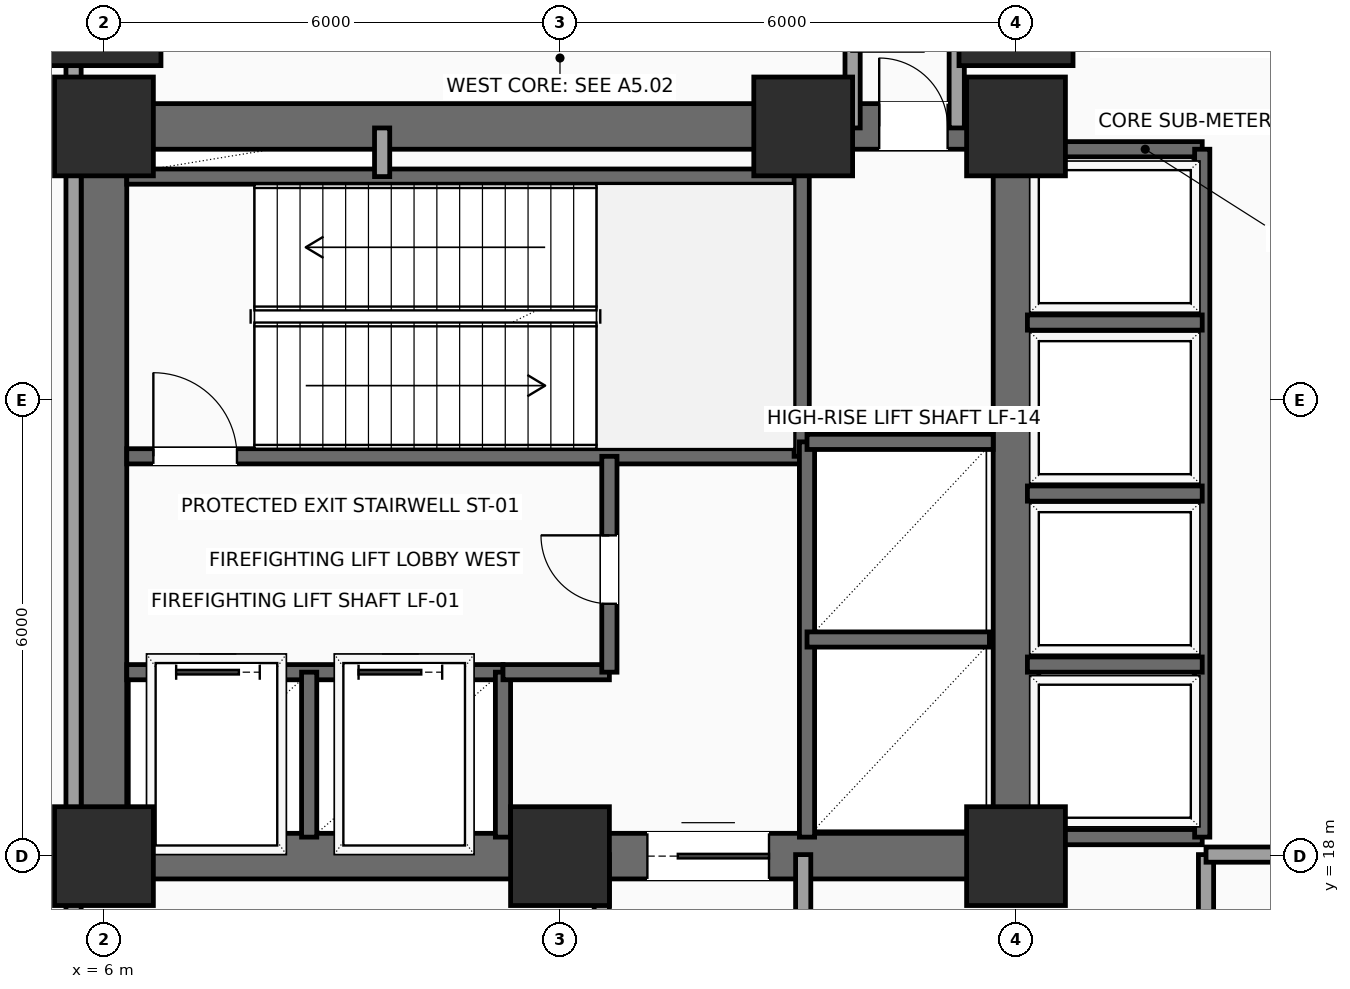
"""IFC4 building model, lengths in metres.
Left out: names, types, materials, properties, quantities, classifications, styles, units other than length and angle.
Written with IfcOpenShell. Run it as: python <this file> out.ifc"""

import sys

from ifc_helpers import new_model, si_unit, direction, frame, frame_2d, origin, origin_2d, place, context, subcontext, project, spatial, rectangle, extrude, element, fill, save


model = new_model("IFC4")
c1 = context("Model", 3, precision=1e-05, world=origin(), true_north=direction((0.0, 1.0)))
c2 = subcontext(c1, "Body", "Model", "MODEL_VIEW")
j1 = project(units=[si_unit("LENGTHUNIT", "METRE"), si_unit("PLANEANGLEUNIT", "RADIAN")], contexts=[c1])
p1 = place(None, origin())
s1 = spatial("IfcSite", under=j1, at=p1, CompositionType="ELEMENT")
p2 = place(p1, origin())
s2 = spatial("IfcBuilding", under=s1, at=p2, CompositionType="ELEMENT")
p3 = place(p2, frame((0.0, 0.0, 27.6)))
s3 = spatial("IfcBuildingStorey", under=s2, at=p3, CompositionType="ELEMENT", Elevation=27.6)
for number, where, z_axis, x_axis in (
    (1, (6.0, 18.0, 0.0), (0.0, 0.0, 1.0), (1.0, 0.0, 0.0)),
    (2, (12.0, 18.0, 0.0), (0.0, 0.0, 1.0), (1.0, 0.0, 0.0)),
    (3, (18.0, 18.0, 0.0), (0.0, 0.0, 1.0), (1.0, 0.0, 0.0)),
    (4, (6.0, 27.6, 0.0), (0.0, 0.0, 1.0), (1.0, 0.0, 0.0)),
    (5, (15.2, 27.6, 0.0), (0.0, 0.0, 1.0), (1.0, 0.0, 0.0)),
    (6, (18.0, 27.6, 0.0), (0.0, 0.0, 1.0), (1.0, 0.0, 0.0)),
):
    element("IfcColumn", number, at=place(p3, frame(where, z_axis=z_axis, x_axis=x_axis)), inside=s3, PredefinedType="COLUMN", context=c2, shape_type="SweptSolid", body=[
        extrude(rectangle(XDim=1.3, YDim=1.3, at=origin_2d()), origin(), (0.0, 0.0, 1.0), 4.8),
    ])
for number, where, z_axis, x_axis in (
    (7, (6.0, 29.15, -0.35), (0.0, 0.0, 1.0), (1.0, 0.0, 0.0)),
    (8, (18.0, 29.15, -0.35), (0.0, 0.0, 1.0), (1.0, 0.0, 0.0)),
):
    element("IfcColumn", number, at=place(p3, frame(where, z_axis=z_axis, x_axis=x_axis)), inside=s3, PredefinedType="COLUMN", context=c2, shape_type="SweptSolid", body=[
        extrude(rectangle(XDim=1.5, YDim=1.5, at=origin_2d()), origin(), (0.0, 0.0, 1.0), 5.15),
    ])
p4 = place(p3, frame((6.0, 18.0, 0.0), z_axis=(0.0, 0.0, 1.0), x_axis=(1.0, 0.0, 0.0)))
e9 = element("IfcWall", 9, at=p4, inside=s3, PredefinedType="SHEAR", context=c2, shape_type="SweptSolid", body=[
    extrude(rectangle(XDim=12.0, YDim=0.6, at=frame_2d((6.0, 0.0))), origin(), (0.0, 0.0, 1.0), 4.55),
])
p5 = place(p4, frame((7.15, 0.0, 0.0)))
e10 = element("IfcOpeningElement", 10, at=p5, cuts=e9, PredefinedType="OPENING", context=c2, shape_type="SweptSolid", body=[
    extrude(rectangle(XDim=1.6, YDim=2.3, at=frame_2d((0.8, 1.15))), frame((0.0, 0.31, 0.0), z_axis=(0.0, -1.0, 0.0), x_axis=(1.0, 0.0, 0.0)), (0.0, 0.0, 1.0), 0.62),
])
p6 = place(p3, frame((6.0, 27.6, 0.0), z_axis=(0.0, 0.0, 1.0), x_axis=(1.0, 0.0, 0.0)))
e11 = element("IfcWall", 11, at=p6, inside=s3, PredefinedType="SHEAR", context=c2, shape_type="SweptSolid", body=[
    extrude(rectangle(XDim=12.0, YDim=0.6, at=frame_2d((6.0, 0.0))), origin(), (0.0, 0.0, 1.0), 4.55),
])
p7 = place(p6, frame((10.2, 0.0, 0.0)))
e12 = element("IfcOpeningElement", 12, at=p7, cuts=e11, PredefinedType="OPENING", context=c2, shape_type="SweptSolid", body=[
    extrude(rectangle(XDim=0.9, YDim=2.15, at=frame_2d((0.45, 1.075))), frame((0.0, 0.31, 0.0), z_axis=(0.0, -1.0, 0.0), x_axis=(1.0, 0.0, 0.0)), (0.0, 0.0, 1.0), 0.62),
])
for number, where, z_axis, x_axis in (
    (13, (6.0, 18.0, 0.0), (0.0, 0.0, 1.0), (0.0, 1.0, 0.0)),
    (14, (18.0, 18.0, 0.0), (0.0, 0.0, 1.0), (0.0, 1.0, 0.0)),
):
    element("IfcWall", number, at=place(p3, frame(where, z_axis=z_axis, x_axis=x_axis)), inside=s3, PredefinedType="SHEAR", context=c2, shape_type="SweptSolid", body=[
        extrude(rectangle(XDim=9.6, YDim=0.6, at=frame_2d((4.8, 0.0))), origin(), (0.0, 0.0, 1.0), 4.55),
    ])
p8 = place(p3, frame((6.3, 23.26, 0.0), z_axis=(0.0, 0.0, 1.0), x_axis=(1.0, 0.0, 0.0)))
e15 = element("IfcWall", 15, at=p8, inside=s3, PredefinedType="SHEAR", context=c2, shape_type="SweptSolid", body=[
    extrude(rectangle(XDim=8.88, YDim=0.2, at=frame_2d((4.44, 0.0))), origin(), (0.0, 0.0, 1.0), 4.55),
])
p9 = place(p8, frame((0.35, 0.0, 0.0)))
e16 = element("IfcOpeningElement", 16, at=p9, cuts=e15, PredefinedType="OPENING", context=c2, shape_type="SweptSolid", body=[
    extrude(rectangle(XDim=1.1, YDim=2.2, at=frame_2d((0.55, 1.1))), frame((0.0, 0.11, 0.0), z_axis=(0.0, -1.0, 0.0), x_axis=(1.0, 0.0, 0.0)), (0.0, 0.0, 1.0), 0.22),
])
p10 = place(p3, frame((6.3, 26.94, 0.0), z_axis=(0.0, 0.0, 1.0), x_axis=(1.0, 0.0, 0.0)))
e17 = element("IfcWall", 17, at=p10, inside=s3, PredefinedType="SHEAR", context=c2, shape_type="SweptSolid", body=[
    extrude(rectangle(XDim=8.88, YDim=0.2, at=frame_2d((4.44, 0.0))), origin(), (0.0, 0.0, 1.0), 4.55),
])
p11 = place(p3, frame((15.18, 23.26, 0.0), z_axis=(0.0, 0.0, 1.0), x_axis=(0.0, 1.0, 0.0)))
e18 = element("IfcWall", 18, at=p11, inside=s3, PredefinedType="SHEAR", context=c2, shape_type="SweptSolid", body=[
    extrude(rectangle(XDim=4.04, YDim=0.2, at=frame_2d((2.02, 0.0))), origin(), (0.0, 0.0, 1.0), 4.55),
])
p12 = place(p3, frame((6.3, 20.42, 0.0), z_axis=(0.0, 0.0, 1.0), x_axis=(1.0, 0.0, 0.0)))
e19 = element("IfcWall", 19, at=p12, inside=s3, PredefinedType="SHEAR", context=c2, shape_type="SweptSolid", body=[
    extrude(rectangle(XDim=4.95, YDim=0.2, at=frame_2d((2.475, 0.0))), origin(), (0.0, 0.0, 1.0), 4.55),
])
p13 = place(p12, frame((0.65, 0.0, 0.0)))
e20 = element("IfcOpeningElement", 20, at=p13, cuts=e19, PredefinedType="OPENING", context=c2, shape_type="SweptSolid", body=[
    extrude(rectangle(XDim=1.1, YDim=2.2, at=frame_2d((0.55, 1.1))), frame((0.0, 0.11, 0.0), z_axis=(0.0, -1.0, 0.0), x_axis=(1.0, 0.0, 0.0)), (0.0, 0.0, 1.0), 0.22),
])
p14 = place(p12, frame((3.05, 0.0, 0.0)))
e21 = element("IfcOpeningElement", 21, at=p14, cuts=e19, PredefinedType="OPENING", context=c2, shape_type="SweptSolid", body=[
    extrude(rectangle(XDim=1.1, YDim=2.2, at=frame_2d((0.55, 1.1))), frame((0.0, 0.11, 0.0), z_axis=(0.0, -1.0, 0.0), x_axis=(1.0, 0.0, 0.0)), (0.0, 0.0, 1.0), 0.22),
])
for number, where, z_axis, x_axis in (
    (22, (8.7, 18.25, 0.0), (0.0, 0.0, 1.0), (0.0, 1.0, 0.0)),
    (23, (11.25, 18.25, 0.0), (0.0, 0.0, 1.0), (0.0, 1.0, 0.0)),
):
    element("IfcWall", number, at=place(p3, frame(where, z_axis=z_axis, x_axis=x_axis)), inside=s3, PredefinedType="SHEAR", context=c2, shape_type="SweptSolid", body=[
        extrude(rectangle(XDim=2.17, YDim=0.2, at=frame_2d((1.085, 0.0))), origin(), (0.0, 0.0, 1.0), 4.55),
    ])
p15 = place(p3, frame((11.25, 20.42, 0.0), z_axis=(0.0, 0.0, 1.0), x_axis=(1.0, 0.0, 0.0)))
e24 = element("IfcWall", 24, at=p15, inside=s3, PredefinedType="SHEAR", context=c2, shape_type="SweptSolid", body=[
    extrude(rectangle(XDim=1.4, YDim=0.2, at=frame_2d((0.7, 0.0))), origin(), (0.0, 0.0, 1.0), 4.55),
])
p16 = place(p3, frame((12.65, 20.42, 0.0), z_axis=(0.0, 0.0, 1.0), x_axis=(0.0, 1.0, 0.0)))
e25 = element("IfcWall", 25, at=p16, inside=s3, PredefinedType="SHEAR", context=c2, shape_type="SweptSolid", body=[
    extrude(rectangle(XDim=2.84, YDim=0.2, at=frame_2d((1.42, 0.0))), origin(), (0.0, 0.0, 1.0), 4.55),
])
p17 = place(p16, frame((0.9, 0.0, 0.0)))
e26 = element("IfcOpeningElement", 26, at=p17, cuts=e25, PredefinedType="OPENING", context=c2, shape_type="SweptSolid", body=[
    extrude(rectangle(XDim=0.9, YDim=2.15, at=frame_2d((0.45, 1.075))), frame((0.0, 0.11, 0.0), z_axis=(0.0, -1.0, 0.0), x_axis=(1.0, 0.0, 0.0)), (0.0, 0.0, 1.0), 0.22),
])
p18 = place(p3, frame((9.66, 26.94, 0.0), z_axis=(0.0, 0.0, 1.0), x_axis=(0.0, 1.0, 0.0)))
e27 = element("IfcWall", 27, at=p18, inside=s3, PredefinedType="SOLIDWALL", context=c2, shape_type="SweptSolid", body=[
    extrude(rectangle(XDim=0.64, YDim=0.2, at=frame_2d((0.32, 0.0))), origin(), (0.0, 0.0, 1.0), 4.55),
])
p19 = place(p3, frame((15.25, 18.25, 0.0), z_axis=(0.0, 0.0, 1.0), x_axis=(0.0, 1.0, 0.0)))
e28 = element("IfcWall", 28, at=p19, inside=s3, PredefinedType="SHEAR", context=c2, shape_type="SweptSolid", body=[
    extrude(rectangle(XDim=5.2, YDim=0.2, at=frame_2d((2.6, 0.0))), origin(), (0.0, 0.0, 1.0), 4.55),
])
p20 = place(p3, frame((15.25, 20.85, 0.0), z_axis=(0.0, 0.0, 1.0), x_axis=(1.0, 0.0, 0.0)))
e29 = element("IfcWall", 29, at=p20, inside=s3, PredefinedType="SHEAR", context=c2, shape_type="SweptSolid", body=[
    extrude(rectangle(XDim=2.4, YDim=0.2, at=frame_2d((1.2, 0.0))), origin(), (0.0, 0.0, 1.0), 4.55),
])
p21 = place(p3, frame((15.25, 23.45, 0.0), z_axis=(0.0, 0.0, 1.0), x_axis=(1.0, 0.0, 0.0)))
e30 = element("IfcWall", 30, at=p21, inside=s3, PredefinedType="SHEAR", context=c2, shape_type="SweptSolid", body=[
    extrude(rectangle(XDim=2.45, YDim=0.2, at=frame_2d((1.225, 0.0))), origin(), (0.0, 0.0, 1.0), 4.55),
])
for number, where, z_axis, x_axis in (
    (31, (18.1, 27.3, 0.0), (0.0, 0.0, 1.0), (1.0, 0.0, 0.0)),
    (32, (18.1, 18.25, 0.0), (0.0, 0.0, 1.0), (1.0, 0.0, 0.0)),
):
    element("IfcWall", number, at=place(p3, frame(where, z_axis=z_axis, x_axis=x_axis)), inside=s3, PredefinedType="SHEAR", context=c2, shape_type="SweptSolid", body=[
        extrude(rectangle(XDim=2.35, YDim=0.2, at=frame_2d((1.175, 0.0))), origin(), (0.0, 0.0, 1.0), 4.55),
    ])
p22 = place(p3, frame((20.45, 18.25, 0.0), z_axis=(0.0, 0.0, 1.0), x_axis=(0.0, 1.0, 0.0)))
e33 = element("IfcWall", 33, at=p22, inside=s3, PredefinedType="SHEAR", context=c2, shape_type="SweptSolid", body=[
    extrude(rectangle(XDim=9.05, YDim=0.2, at=frame_2d((4.525, 0.0))), origin(), (0.0, 0.0, 1.0), 4.55),
])
for number, where, z_axis, x_axis in (
    (34, (18.15, 20.52, 0.0), (0.0, 0.0, 1.0), (1.0, 0.0, 0.0)),
    (35, (18.15, 22.77, 0.0), (0.0, 0.0, 1.0), (1.0, 0.0, 0.0)),
    (36, (18.15, 25.02, 0.0), (0.0, 0.0, 1.0), (1.0, 0.0, 0.0)),
):
    element("IfcWall", number, at=place(p3, frame(where, z_axis=z_axis, x_axis=x_axis)), inside=s3, PredefinedType="SHEAR", context=c2, shape_type="SweptSolid", body=[
        extrude(rectangle(XDim=2.3, YDim=0.2, at=frame_2d((1.15, 0.0))), origin(), (0.0, 0.0, 1.0), 4.55),
    ])
p23 = place(p3, frame((17.22, 33.8, 0.0), z_axis=(0.0, 0.0, 1.0), x_axis=(0.0, -1.0, 0.0)))
e37 = element("IfcWall", 37, at=p23, inside=s3, PredefinedType="SOLIDWALL", context=c2, shape_type="SweptSolid", body=[
    extrude(rectangle(XDim=6.22, YDim=0.2, at=frame_2d((3.11, 0.0))), origin(), (0.0, 0.0, 1.0), 4.55),
])
p24 = place(p3, frame((15.85, 27.58, 0.0), z_axis=(0.0, 0.0, 1.0), x_axis=(0.0, 1.0, 0.0)))
e38 = element("IfcWall", 38, at=p24, inside=s3, PredefinedType="SOLIDWALL", context=c2, shape_type="SweptSolid", body=[
    extrude(rectangle(XDim=1.12, YDim=0.2, at=frame_2d((0.56, 0.0))), origin(), (0.0, 0.0, 1.0), 4.55),
])
p25 = place(p3, frame((5.6, 31.6, 0.0), z_axis=(0.0, 0.0, 1.0), x_axis=(0.0, -1.0, 0.0)))
e39 = element("IfcWall", 39, at=p25, inside=s3, PredefinedType="SOLIDWALL", context=c2, shape_type="SweptSolid", body=[
    extrude(rectangle(XDim=15.15, YDim=0.2, at=frame_2d((7.575, 0.0))), origin(), (0.0, 0.0, 1.0), 4.55),
])
for number, where, z_axis, x_axis in (
    (40, (12.55, 16.45, 0.0), (0.0, 0.0, 1.0), (0.0, 1.0, 0.0)),
    (41, (15.2, 18.02, 0.0), (0.0, 0.0, 1.0), (0.0, -1.0, 0.0)),
    (42, (20.5, 16.45, 0.0), (0.0, 0.0, 1.0), (0.0, 1.0, 0.0)),
):
    element("IfcWall", number, at=place(p3, frame(where, z_axis=z_axis, x_axis=x_axis)), inside=s3, PredefinedType="SOLIDWALL", context=c2, shape_type="SweptSolid", body=[
        extrude(rectangle(XDim=1.57, YDim=0.2, at=frame_2d((0.785, 0.0))), origin(), (0.0, 0.0, 1.0), 4.55),
    ])
p26 = place(p3, frame((20.5, 18.02, 0.0), z_axis=(0.0, 0.0, 1.0), x_axis=(1.0, 0.0, 0.0)))
e43 = element("IfcWall", 43, at=p26, inside=s3, PredefinedType="SOLIDWALL", context=c2, shape_type="SweptSolid", body=[
    extrude(rectangle(XDim=3.35, YDim=0.2, at=frame_2d((1.675, 0.0))), origin(), (0.0, 0.0, 1.0), 3.892),
])
p27 = place(p5, origin())
e44 = element("IfcDoor", 44, at=p27, inside=s3, OperationType="DOUBLE_DOOR_SLIDING", PredefinedType="DOOR", context=c2, shape_type="SweptSolid", body=[
    extrude(rectangle(XDim=1.6, YDim=2.3, at=frame_2d((0.8, 1.15))), frame((0.0, 0.025, 0.0), z_axis=(0.0, -1.0, 0.0), x_axis=(1.0, 0.0, 0.0)), (0.0, 0.0, 1.0), 0.05),
])
fill(e10, e44)
p28 = place(p7, origin())
e45 = element("IfcDoor", 45, at=p28, inside=s3, OperationType="SINGLE_SWING_LEFT", PredefinedType="DOOR", context=c2, shape_type="SweptSolid", body=[
    extrude(rectangle(XDim=0.9, YDim=2.15, at=frame_2d((0.45, 1.075))), frame((0.0, 0.025, 0.0), z_axis=(0.0, -1.0, 0.0), x_axis=(1.0, 0.0, 0.0)), (0.0, 0.0, 1.0), 0.05),
])
fill(e12, e45)
p29 = place(p9, origin())
e46 = element("IfcDoor", 46, at=p29, inside=s3, OperationType="SINGLE_SWING_LEFT", PredefinedType="DOOR", context=c2, shape_type="SweptSolid", body=[
    extrude(rectangle(XDim=1.1, YDim=2.2, at=frame_2d((0.55, 1.1))), frame((0.0, 0.025, 0.0), z_axis=(0.0, -1.0, 0.0), x_axis=(1.0, 0.0, 0.0)), (0.0, 0.0, 1.0), 0.05),
])
fill(e16, e46)
p30 = place(p13, origin())
e47 = element("IfcDoor", 47, at=p30, inside=s3, OperationType="SLIDING_TO_LEFT", PredefinedType="DOOR", context=c2, shape_type="SweptSolid", body=[
    extrude(rectangle(XDim=1.1, YDim=2.2, at=frame_2d((0.55, 1.1))), frame((0.0, 0.025, 0.0), z_axis=(0.0, -1.0, 0.0), x_axis=(1.0, 0.0, 0.0)), (0.0, 0.0, 1.0), 0.05),
])
fill(e20, e47)
p31 = place(p14, origin())
e48 = element("IfcDoor", 48, at=p31, inside=s3, OperationType="SLIDING_TO_LEFT", PredefinedType="DOOR", context=c2, shape_type="SweptSolid", body=[
    extrude(rectangle(XDim=1.1, YDim=2.2, at=frame_2d((0.55, 1.1))), frame((0.0, 0.025, 0.0), z_axis=(0.0, -1.0, 0.0), x_axis=(1.0, 0.0, 0.0)), (0.0, 0.0, 1.0), 0.05),
])
fill(e21, e48)
p32 = place(p17, origin())
e49 = element("IfcDoor", 49, at=p32, inside=s3, OperationType="SINGLE_SWING_RIGHT", PredefinedType="DOOR", context=c2, shape_type="SweptSolid", body=[
    extrude(rectangle(XDim=0.9, YDim=2.15, at=frame_2d((0.45, 1.075))), frame((0.0, 0.025, 0.0), z_axis=(0.0, -1.0, 0.0), x_axis=(1.0, 0.0, 0.0)), (0.0, 0.0, 1.0), 0.05),
])
fill(e26, e49)
save(model, sys.argv[1])
